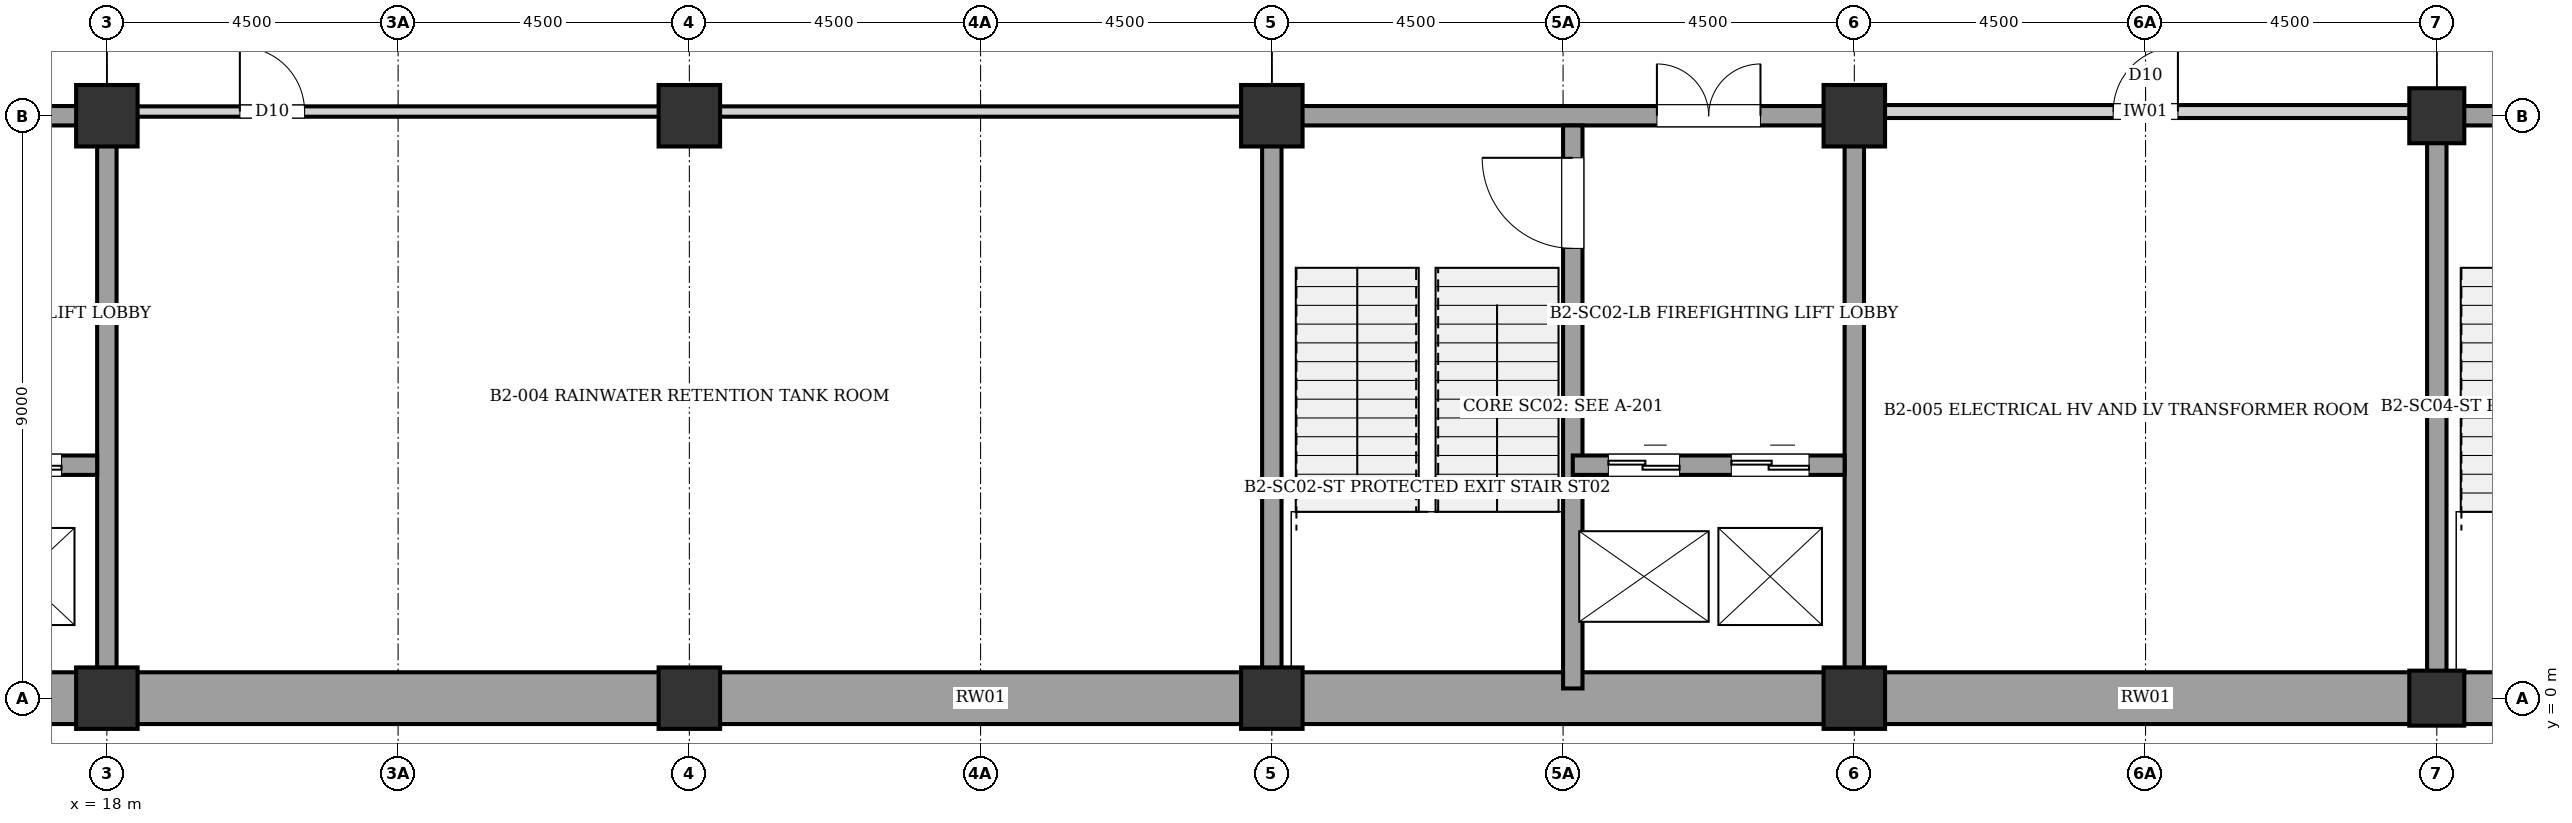
"""IFC4 building model, lengths in metres.
Left out: names, types, materials, properties, quantities, classifications, styles, units other than length and angle.
Written with IfcOpenShell. Run it as: python <this file> out.ifc"""

import sys

from ifc_helpers import new_model, si_unit, direction, frame, frame_2d, origin, origin_2d, place, context, subcontext, project, spatial, rectangle, extrude, element, fill, save


model = new_model("IFC4")
c1 = context("Model", 3, precision=1e-05, world=origin(), true_north=direction((0.0, 1.0)))
c2 = subcontext(c1, "Body", "Model", "MODEL_VIEW")
j1 = project(units=[si_unit("LENGTHUNIT", "METRE"), si_unit("PLANEANGLEUNIT", "RADIAN")], contexts=[c1])
p1 = place(None, origin())
s1 = spatial("IfcSite", under=j1, at=p1, CompositionType="ELEMENT")
p2 = place(p1, origin())
s2 = spatial("IfcBuilding", under=s1, at=p2, CompositionType="ELEMENT")
p3 = place(p2, frame((0.0, 0.0, -8.96)))
s3 = spatial("IfcBuildingStorey", under=s2, at=p3, CompositionType="ELEMENT", Elevation=-8.96)
for number, where, z_axis, x_axis in (
    (1, (18.0, 0.0, 0.0), (0.0, 0.0, 1.0), (1.0, 0.0, 0.0)),
    (2, (18.0, 9.0, 0.0), (0.0, 0.0, 1.0), (1.0, 0.0, 0.0)),
    (3, (27.0, 0.0, 0.0), (0.0, 0.0, 1.0), (1.0, 0.0, 0.0)),
    (4, (27.0, 9.0, 0.0), (0.0, 0.0, 1.0), (1.0, 0.0, 0.0)),
    (5, (36.0, 0.0, 0.0), (0.0, 0.0, 1.0), (1.0, 0.0, 0.0)),
    (6, (36.0, 9.0, 0.0), (0.0, 0.0, 1.0), (1.0, 0.0, 0.0)),
    (7, (45.0, 0.0, 0.0), (0.0, 0.0, 1.0), (1.0, 0.0, 0.0)),
    (8, (45.0, 9.0, 0.0), (0.0, 0.0, 1.0), (1.0, 0.0, 0.0)),
):
    element("IfcColumn", number, at=place(p3, frame(where, z_axis=z_axis, x_axis=x_axis)), inside=s3, PredefinedType="COLUMN", context=c2, shape_type="SweptSolid", body=[
        extrude(rectangle(XDim=0.95, YDim=0.95, at=origin_2d()), origin(), (0.0, 0.0, 1.0), 4.48),
    ])
for number, where, z_axis, x_axis in (
    (9, (54.0, 0.0, 0.0), (0.0, 0.0, 1.0), (1.0, 0.0, 0.0)),
    (10, (54.0, 9.0, 0.0), (0.0, 0.0, 1.0), (1.0, 0.0, 0.0)),
):
    element("IfcColumn", number, at=place(p3, frame(where, z_axis=z_axis, x_axis=x_axis)), inside=s3, PredefinedType="COLUMN", context=c2, shape_type="SweptSolid", body=[
        extrude(rectangle(XDim=0.85, YDim=0.85, at=origin_2d()), origin(), (0.0, 0.0, 1.0), 4.48),
    ])
for number, where, z_axis, x_axis in (
    (11, (63.0, 0.0, 0.0), (0.0, 0.0, 1.0), (-1.0, 0.0, 0.0)),
    (12, (54.0, 0.0, 0.0), (0.0, 0.0, 1.0), (-1.0, 0.0, 0.0)),
    (13, (45.0, 0.0, 0.0), (0.0, 0.0, 1.0), (-1.0, 0.0, 0.0)),
    (14, (36.0, 0.0, 0.0), (0.0, 0.0, 1.0), (-1.0, 0.0, 0.0)),
    (15, (27.0, 0.0, 0.0), (0.0, 0.0, 1.0), (-1.0, 0.0, 0.0)),
    (16, (18.0, 0.0, 0.0), (0.0, 0.0, 1.0), (-1.0, 0.0, 0.0)),
):
    element("IfcWall", number, at=place(p3, frame(where, z_axis=z_axis, x_axis=x_axis)), inside=s3, PredefinedType="USERDEFINED", context=c2, shape_type="SweptSolid", body=[
        extrude(rectangle(XDim=9.0, YDim=0.8, at=frame_2d((4.5, 0.0))), origin(), (0.0, 0.0, 1.0), 4.2),
    ])
p4 = place(p3, frame((18.0, 0.0, 0.0), z_axis=(0.0, 0.0, 1.0), x_axis=(0.0, 1.0, 0.0)))
e17 = element("IfcWall", 17, at=p4, inside=s3, PredefinedType="SHEAR", context=c2, shape_type="SweptSolid", body=[
    extrude(rectangle(XDim=9.0, YDim=0.3, at=frame_2d((4.5, 0.0))), origin(), (0.0, 0.0, 1.0), 4.2),
])
p5 = place(p3, frame((9.0, 9.0, 0.0), z_axis=(0.0, 0.0, 1.0), x_axis=(1.0, 0.0, 0.0)))
e18 = element("IfcWall", 18, at=p5, inside=s3, PredefinedType="SHEAR", context=c2, shape_type="SweptSolid", body=[
    extrude(rectangle(XDim=9.0, YDim=0.3, at=frame_2d((4.5, 0.0))), origin(), (0.0, 0.0, 1.0), 4.2),
])
p6 = place(p5, frame((5.95, 0.0, 0.0)))
e19 = element("IfcOpeningElement", 19, at=p6, cuts=e18, PredefinedType="OPENING", context=c2, shape_type="SweptSolid", body=[
    extrude(rectangle(XDim=1.6, YDim=2.1, at=frame_2d((0.8, 1.05))), frame((0.0, 0.16, 0.0), z_axis=(0.0, -1.0, 0.0), x_axis=(1.0, 0.0, 0.0)), (0.0, 0.0, 1.0), 0.32),
])
p7 = place(p3, frame((13.65, 3.6, 0.0), z_axis=(0.0, 0.0, 1.0), x_axis=(1.0, 0.0, 0.0)))
e20 = element("IfcWall", 20, at=p7, inside=s3, PredefinedType="SHEAR", context=c2, shape_type="SweptSolid", body=[
    extrude(rectangle(XDim=4.2, YDim=0.3, at=frame_2d((2.1, 0.0))), origin(), (0.0, 0.0, 1.0), 4.2),
])
p8 = place(p7, frame((0.55, 0.0, 0.0)))
e21 = element("IfcOpeningElement", 21, at=p8, cuts=e20, PredefinedType="OPENING", context=c2, shape_type="SweptSolid", body=[
    extrude(rectangle(XDim=1.1, YDim=2.1, at=frame_2d((0.55, 1.05))), frame((0.0, 0.16, 0.0), z_axis=(0.0, -1.0, 0.0), x_axis=(1.0, 0.0, 0.0)), (0.0, 0.0, 1.0), 0.32),
])
p9 = place(p7, frame((2.45, 0.0, 0.0)))
e22 = element("IfcOpeningElement", 22, at=p9, cuts=e20, PredefinedType="OPENING", context=c2, shape_type="SweptSolid", body=[
    extrude(rectangle(XDim=1.2, YDim=2.2, at=frame_2d((0.6, 1.1))), frame((0.0, 0.16, 0.0), z_axis=(0.0, -1.0, 0.0), x_axis=(1.0, 0.0, 0.0)), (0.0, 0.0, 1.0), 0.32),
])
p10 = place(p3, frame((45.0, 0.0, 0.0), z_axis=(0.0, 0.0, 1.0), x_axis=(0.0, 1.0, 0.0)))
e23 = element("IfcWall", 23, at=p10, inside=s3, PredefinedType="SHEAR", context=c2, shape_type="SweptSolid", body=[
    extrude(rectangle(XDim=9.0, YDim=0.3, at=frame_2d((4.5, 0.0))), origin(), (0.0, 0.0, 1.0), 4.2),
])
p11 = place(p3, frame((36.0, 9.0, 0.0), z_axis=(0.0, 0.0, 1.0), x_axis=(1.0, 0.0, 0.0)))
e24 = element("IfcWall", 24, at=p11, inside=s3, PredefinedType="SHEAR", context=c2, shape_type="SweptSolid", body=[
    extrude(rectangle(XDim=9.0, YDim=0.3, at=frame_2d((4.5, 0.0))), origin(), (0.0, 0.0, 1.0), 4.2),
])
p12 = place(p11, frame((5.95, 0.0, 0.0)))
e25 = element("IfcOpeningElement", 25, at=p12, cuts=e24, PredefinedType="OPENING", context=c2, shape_type="SweptSolid", body=[
    extrude(rectangle(XDim=1.6, YDim=2.1, at=frame_2d((0.8, 1.05))), frame((0.0, 0.16, 0.0), z_axis=(0.0, -1.0, 0.0), x_axis=(1.0, 0.0, 0.0)), (0.0, 0.0, 1.0), 0.32),
])
p13 = place(p3, frame((36.0, 0.0, 0.0), z_axis=(0.0, 0.0, 1.0), x_axis=(0.0, 1.0, 0.0)))
e26 = element("IfcWall", 26, at=p13, inside=s3, PredefinedType="SHEAR", context=c2, shape_type="SweptSolid", body=[
    extrude(rectangle(XDim=9.0, YDim=0.3, at=frame_2d((4.5, 0.0))), origin(), (0.0, 0.0, 1.0), 4.2),
])
p14 = place(p3, frame((40.65, 0.15, 0.0), z_axis=(0.0, 0.0, 1.0), x_axis=(0.0, 1.0, 0.0)))
e27 = element("IfcWall", 27, at=p14, inside=s3, PredefinedType="SHEAR", context=c2, shape_type="SweptSolid", body=[
    extrude(rectangle(XDim=8.7, YDim=0.3, at=frame_2d((4.35, 0.0))), origin(), (0.0, 0.0, 1.0), 4.2),
])
p15 = place(p14, frame((6.8, 0.0, 0.0)))
e28 = element("IfcOpeningElement", 28, at=p15, cuts=e27, PredefinedType="OPENING", context=c2, shape_type="SweptSolid", body=[
    extrude(rectangle(XDim=1.4, YDim=2.02, at=frame_2d((0.7, 1.01))), frame((0.0, 0.16, 0.0), z_axis=(0.0, -1.0, 0.0), x_axis=(1.0, 0.0, 0.0)), (0.0, 0.0, 1.0), 0.32),
])
p16 = place(p3, frame((40.65, 3.6, 0.0), z_axis=(0.0, 0.0, 1.0), x_axis=(1.0, 0.0, 0.0)))
e29 = element("IfcWall", 29, at=p16, inside=s3, PredefinedType="SHEAR", context=c2, shape_type="SweptSolid", body=[
    extrude(rectangle(XDim=4.2, YDim=0.3, at=frame_2d((2.1, 0.0))), origin(), (0.0, 0.0, 1.0), 4.2),
])
p17 = place(p16, frame((0.55, 0.0, 0.0)))
e30 = element("IfcOpeningElement", 30, at=p17, cuts=e29, PredefinedType="OPENING", context=c2, shape_type="SweptSolid", body=[
    extrude(rectangle(XDim=1.1, YDim=2.1, at=frame_2d((0.55, 1.05))), frame((0.0, 0.16, 0.0), z_axis=(0.0, -1.0, 0.0), x_axis=(1.0, 0.0, 0.0)), (0.0, 0.0, 1.0), 0.32),
])
p18 = place(p16, frame((2.45, 0.0, 0.0)))
e31 = element("IfcOpeningElement", 31, at=p18, cuts=e29, PredefinedType="OPENING", context=c2, shape_type="SweptSolid", body=[
    extrude(rectangle(XDim=1.2, YDim=2.2, at=frame_2d((0.6, 1.1))), frame((0.0, 0.16, 0.0), z_axis=(0.0, -1.0, 0.0), x_axis=(1.0, 0.0, 0.0)), (0.0, 0.0, 1.0), 0.32),
])
p19 = place(p3, frame((54.0, 9.0, 0.0), z_axis=(0.0, 0.0, 1.0), x_axis=(1.0, 0.0, 0.0)))
e32 = element("IfcWall", 32, at=p19, inside=s3, PredefinedType="SHEAR", context=c2, shape_type="SweptSolid", body=[
    extrude(rectangle(XDim=9.0, YDim=0.3, at=frame_2d((4.5, 0.0))), origin(), (0.0, 0.0, 1.0), 4.2),
])
p20 = place(p19, frame((6.05, 0.0, 0.0)))
e33 = element("IfcOpeningElement", 33, at=p20, cuts=e32, PredefinedType="OPENING", context=c2, shape_type="SweptSolid", body=[
    extrude(rectangle(XDim=1.4, YDim=2.02, at=frame_2d((0.7, 1.01))), frame((0.0, 0.16, 0.0), z_axis=(0.0, -1.0, 0.0), x_axis=(1.0, 0.0, 0.0)), (0.0, 0.0, 1.0), 0.32),
])
p21 = place(p3, frame((54.0, 0.0, 0.0), z_axis=(0.0, 0.0, 1.0), x_axis=(0.0, 1.0, 0.0)))
e34 = element("IfcWall", 34, at=p21, inside=s3, PredefinedType="SHEAR", context=c2, shape_type="SweptSolid", body=[
    extrude(rectangle(XDim=9.0, YDim=0.3, at=frame_2d((4.5, 0.0))), origin(), (0.0, 0.0, 1.0), 4.2),
])
p22 = place(p3, frame((18.155, 9.065, 0.0), z_axis=(0.0, 0.0, 1.0), x_axis=(1.0, 0.0, 0.0)))
e35 = element("IfcWall", 35, at=p22, inside=s3, PredefinedType="PARTITIONING", context=c2, shape_type="SweptSolid", body=[
    extrude(rectangle(XDim=17.69, YDim=0.16, at=frame_2d((8.845, 0.0))), origin(), (0.0, 0.0, 1.0), 3.3),
])
p23 = place(p22, frame((1.9, 0.0, 0.0)))
e36 = element("IfcOpeningElement", 36, at=p23, cuts=e35, PredefinedType="OPENING", context=c2, shape_type="SweptSolid", body=[
    extrude(rectangle(XDim=1.0, YDim=2.1, at=frame_2d((0.5, 1.05))), frame((0.0, 0.09, 0.0), z_axis=(0.0, -1.0, 0.0), x_axis=(1.0, 0.0, 0.0)), (0.0, 0.0, 1.0), 0.18),
])
p24 = place(p3, frame((45.155, 9.065, 0.0), z_axis=(0.0, 0.0, 1.0), x_axis=(1.0, 0.0, 0.0)))
e37 = element("IfcWall", 37, at=p24, inside=s3, PredefinedType="PARTITIONING", context=c2, shape_type="SweptSolid", body=[
    extrude(rectangle(XDim=8.69, YDim=0.2, at=frame_2d((4.345, 0.0))), origin(), (0.0, 0.0, 1.0), 3.3),
])
p25 = place(p24, frame((3.845, 0.0, 0.0)))
e38 = element("IfcOpeningElement", 38, at=p25, cuts=e37, PredefinedType="OPENING", context=c2, shape_type="SweptSolid", body=[
    extrude(rectangle(XDim=1.0, YDim=2.1, at=frame_2d((0.5, 1.05))), frame((0.0, 0.11, 0.0), z_axis=(0.0, -1.0, 0.0), x_axis=(1.0, 0.0, 0.0)), (0.0, 0.0, 1.0), 0.22),
])
p26 = place(p9, origin())
e39 = element("IfcDoor", 39, at=p26, inside=s3, OperationType="DOUBLE_DOOR_SLIDING", PredefinedType="DOOR", context=c2, shape_type="SweptSolid", body=[
    extrude(rectangle(XDim=1.2, YDim=2.2, at=frame_2d((0.6, 1.1))), frame((0.0, 0.025, 0.0), z_axis=(0.0, -1.0, 0.0), x_axis=(1.0, 0.0, 0.0)), (0.0, 0.0, 1.0), 0.05),
])
fill(e22, e39)
p27 = place(p12, origin())
e40 = element("IfcDoor", 40, at=p27, inside=s3, OperationType="DOUBLE_DOOR_SINGLE_SWING", PredefinedType="DOOR", context=c2, shape_type="SweptSolid", body=[
    extrude(rectangle(XDim=1.6, YDim=2.1, at=frame_2d((0.8, 1.05))), frame((0.0, 0.025, 0.0), z_axis=(0.0, -1.0, 0.0), x_axis=(1.0, 0.0, 0.0)), (0.0, 0.0, 1.0), 0.05),
])
fill(e25, e40)
p28 = place(p15, origin())
e41 = element("IfcDoor", 41, at=p28, inside=s3, OperationType="SINGLE_SWING_RIGHT", PredefinedType="DOOR", context=c2, shape_type="SweptSolid", body=[
    extrude(rectangle(XDim=1.4, YDim=2.02, at=frame_2d((0.7, 1.01))), frame((0.0, 0.025, 0.0), z_axis=(0.0, -1.0, 0.0), x_axis=(1.0, 0.0, 0.0)), (0.0, 0.0, 1.0), 0.05),
])
fill(e28, e41)
p29 = place(p17, origin())
e42 = element("IfcDoor", 42, at=p29, inside=s3, OperationType="DOUBLE_DOOR_SLIDING", PredefinedType="DOOR", context=c2, shape_type="SweptSolid", body=[
    extrude(rectangle(XDim=1.1, YDim=2.1, at=frame_2d((0.55, 1.05))), frame((0.0, 0.025, 0.0), z_axis=(0.0, -1.0, 0.0), x_axis=(1.0, 0.0, 0.0)), (0.0, 0.0, 1.0), 0.05),
])
fill(e30, e42)
p30 = place(p18, origin())
e43 = element("IfcDoor", 43, at=p30, inside=s3, OperationType="DOUBLE_DOOR_SLIDING", PredefinedType="DOOR", context=c2, shape_type="SweptSolid", body=[
    extrude(rectangle(XDim=1.2, YDim=2.2, at=frame_2d((0.6, 1.1))), frame((0.0, 0.025, 0.0), z_axis=(0.0, -1.0, 0.0), x_axis=(1.0, 0.0, 0.0)), (0.0, 0.0, 1.0), 0.05),
])
fill(e31, e43)
p31 = place(p23, origin())
e44 = element("IfcDoor", 44, at=p31, inside=s3, OperationType="SINGLE_SWING_LEFT", PredefinedType="DOOR", context=c2, shape_type="SweptSolid", body=[
    extrude(rectangle(XDim=1.0, YDim=2.1, at=frame_2d((0.5, 1.05))), frame((0.0, 0.025, 0.0), z_axis=(0.0, -1.0, 0.0), x_axis=(1.0, 0.0, 0.0)), (0.0, 0.0, 1.0), 0.05),
])
fill(e36, e44)
p32 = place(p25, origin())
e45 = element("IfcDoor", 45, at=p32, inside=s3, OperationType="SINGLE_SWING_RIGHT", PredefinedType="DOOR", context=c2, shape_type="SweptSolid", body=[
    extrude(rectangle(XDim=1.0, YDim=2.1, at=frame_2d((0.5, 1.05))), frame((0.0, 0.025, 0.0), z_axis=(0.0, -1.0, 0.0), x_axis=(1.0, 0.0, 0.0)), (0.0, 0.0, 1.0), 0.05),
])
fill(e38, e45)
save(model, sys.argv[1])
